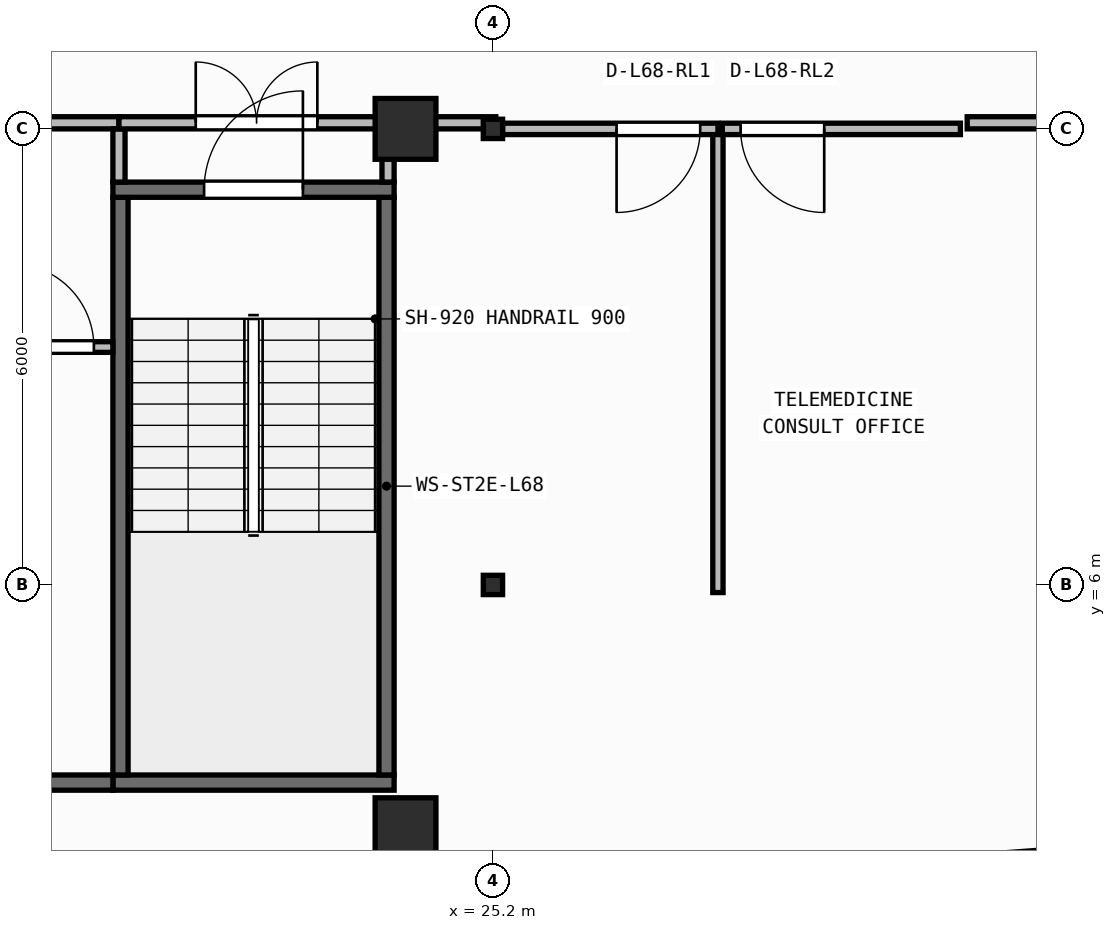
"""IFC4 building model, lengths in metres.
Left out: names, types, materials, properties, quantities, classifications, styles, units other than length and angle.
Written with IfcOpenShell. Run it as: python <this file> out.ifc"""

import sys

from ifc_helpers import new_model, si_unit, direction, frame, frame_2d, origin, origin_2d, place, context, subcontext, project, spatial, rectangle, i_section, extrude, element, fill, save


model = new_model("IFC4")
c1 = context("Model", 3, precision=1e-05, world=origin(), true_north=direction((0.0, 1.0)))
c2 = subcontext(c1, "Body", "Model", "MODEL_VIEW")
j1 = project(units=[si_unit("LENGTHUNIT", "METRE"), si_unit("PLANEANGLEUNIT", "RADIAN")], contexts=[c1])
p1 = place(None, origin())
s1 = spatial("IfcSite", under=j1, at=p1, CompositionType="ELEMENT")
p2 = place(p1, origin())
s2 = spatial("IfcBuilding", under=s1, at=p2, CompositionType="ELEMENT")
p3 = place(p2, frame((0.0, 0.0, 276.3)))
s3 = spatial("IfcBuildingStorey", under=s2, at=p3, CompositionType="ELEMENT", Elevation=276.3)
p4 = place(p3, frame((24.05, 2.8, 0.0), z_axis=(0.0, 0.0, 1.0), x_axis=(1.0, 0.0, 0.0)))
e1 = element("IfcColumn", 1, at=p4, inside=s3, PredefinedType="COLUMN", context=c2, shape_type="SweptSolid", body=[
    extrude(rectangle(XDim=0.8, YDim=0.8, at=origin_2d()), origin(), (0.0, 0.0, 1.0), 3.95),
])
p5 = place(p3, frame((25.2, 6.0, 0.0), z_axis=(0.0, 0.0, 1.0), x_axis=(1.0, 0.0, 0.0)))
e2 = element("IfcColumn", 2, at=p5, inside=s3, PredefinedType="COLUMN", context=c2, shape_type="SweptSolid", body=[
    extrude(i_section(OverallWidth=0.254, OverallDepth=0.254, WebThickness=0.009, FlangeThickness=0.014, FilletRadius=0.013, at=origin_2d()), origin(), (0.0, 0.0, 1.0), 3.95),
])
p6 = place(p3, frame((24.05, 12.0, 0.0), z_axis=(0.0, 0.0, 1.0), x_axis=(1.0, 0.0, 0.0)))
e3 = element("IfcColumn", 3, at=p6, inside=s3, PredefinedType="COLUMN", context=c2, shape_type="SweptSolid", body=[
    extrude(rectangle(XDim=0.8, YDim=0.8, at=origin_2d()), origin(), (0.0, 0.0, 1.0), 3.95),
])
p7 = place(p3, frame((25.2, 12.0, 0.0), z_axis=(0.0, 0.0, 1.0), x_axis=(1.0, 0.0, 0.0)))
e4 = element("IfcColumn", 4, at=p7, inside=s3, PredefinedType="COLUMN", context=c2, shape_type="SweptSolid", body=[
    extrude(i_section(OverallWidth=0.254, OverallDepth=0.254, WebThickness=0.009, FlangeThickness=0.014, FilletRadius=0.013, at=origin_2d()), origin(), (0.0, 0.0, 1.0), 3.95),
])
p8 = place(p3, frame((2.46, 0.172, 0.0), z_axis=(0.0, 0.0, 1.0), x_axis=(0.997289775118, 0.073573802713, 0.0)))
e5 = element("IfcWall", 5, at=p8, inside=s3, PredefinedType="STANDARD", context=c2, shape_type="SweptSolid", body=[
    extrude(rectangle(XDim=36.379, YDim=0.26, at=frame_2d((18.189, 0.0))), origin(), (0.0, 0.0, 1.0), 3.71),
])
p9 = place(p8, frame((16.989, 0.0, 0.9)))
e6 = element("IfcOpeningElement", 6, at=p9, cuts=e5, PredefinedType="OPENING", context=c2, shape_type="SweptSolid", body=[
    extrude(rectangle(XDim=2.4, YDim=1.65, at=frame_2d((1.2, 0.825))), frame((0.0, 0.14, 0.0), z_axis=(0.0, -1.0, 0.0), x_axis=(1.0, 0.0, 0.0)), (0.0, 0.0, 1.0), 0.28),
])
p10 = place(p3, frame((20.2, 3.4, 0.0), z_axis=(0.0, 0.0, 1.0), x_axis=(1.0, 0.0, 0.0)))
e7 = element("IfcWall", 7, at=p10, inside=s3, PredefinedType="SHEAR", context=c2, shape_type="SweptSolid", body=[
    extrude(rectangle(XDim=3.7, YDim=0.2, at=frame_2d((1.85, 0.0))), origin(), (0.0, 0.0, 1.0), 3.71),
])
for number, where, z_axis, x_axis in (
    (8, (20.3, 3.5, 0.0), (0.0, 0.0, 1.0), (0.0, 1.0, 0.0)),
    (9, (23.8, 3.5, 0.0), (0.0, 0.0, 1.0), (0.0, 1.0, 0.0)),
):
    element("IfcWall", number, at=place(p3, frame(where, z_axis=z_axis, x_axis=x_axis)), inside=s3, PredefinedType="SHEAR", context=c2, shape_type="SweptSolid", body=[
        extrude(rectangle(XDim=7.6, YDim=0.2, at=frame_2d((3.8, 0.0))), origin(), (0.0, 0.0, 1.0), 3.71),
    ])
p11 = place(p3, frame((20.2, 11.2, 0.0), z_axis=(0.0, 0.0, 1.0), x_axis=(1.0, 0.0, 0.0)))
e10 = element("IfcWall", 10, at=p11, inside=s3, PredefinedType="SHEAR", context=c2, shape_type="SweptSolid", body=[
    extrude(rectangle(XDim=3.7, YDim=0.2, at=frame_2d((1.85, 0.0))), origin(), (0.0, 0.0, 1.0), 3.71),
])
p12 = place(p11, frame((1.2, 0.0, 0.0)))
e11 = element("IfcOpeningElement", 11, at=p12, cuts=e10, PredefinedType="OPENING", context=c2, shape_type="SweptSolid", body=[
    extrude(rectangle(XDim=1.3, YDim=2.15, at=frame_2d((0.65, 1.075))), frame((0.0, 0.11, 0.0), z_axis=(0.0, -1.0, 0.0), x_axis=(1.0, 0.0, 0.0)), (0.0, 0.0, 1.0), 0.22),
])
p13 = place(p3, frame((6.5, 3.4, 0.0), z_axis=(0.0, 0.0, 1.0), x_axis=(1.0, 0.0, 0.0)))
e12 = element("IfcWall", 12, at=p13, inside=s3, PredefinedType="SHEAR", context=c2, shape_type="SweptSolid", body=[
    extrude(rectangle(XDim=13.7, YDim=0.2, at=frame_2d((6.85, 0.0))), origin(), (0.0, 0.0, 1.0), 3.71),
])
p14 = place(p3, frame((18.61, 9.13, 0.0), z_axis=(0.0, 0.0, 1.0), x_axis=(1.0, 0.0, 0.0)))
e13 = element("IfcWall", 13, at=p14, inside=s3, PredefinedType="PARTITIONING", context=c2, shape_type="SweptSolid", body=[
    extrude(rectangle(XDim=1.59, YDim=0.14, at=frame_2d((0.795, 0.0))), origin(), (0.0, 0.0, 1.0), 3.71),
])
p15 = place(p14, frame((0.24, 0.0, 0.0)))
e14 = element("IfcOpeningElement", 14, at=p15, cuts=e13, PredefinedType="OPENING", context=c2, shape_type="SweptSolid", body=[
    extrude(rectangle(XDim=1.1, YDim=2.1, at=frame_2d((0.55, 1.05))), frame((0.0, 0.08, 0.0), z_axis=(0.0, -1.0, 0.0), x_axis=(1.0, 0.0, 0.0)), (0.0, 0.0, 1.0), 0.16),
])
p16 = place(p3, frame((12.58, 12.08, 0.0), z_axis=(0.0, 0.0, 1.0), x_axis=(1.0, 0.0, 0.0)))
e15 = element("IfcWall", 15, at=p16, inside=s3, PredefinedType="PARTITIONING", context=c2, shape_type="SweptSolid", body=[
    extrude(rectangle(XDim=7.7, YDim=0.16, at=frame_2d((3.85, 0.0))), origin(), (0.0, 0.0, 1.0), 3.157),
])
p17 = place(p16, frame((3.05, 0.0, 0.0)))
e16 = element("IfcOpeningElement", 16, at=p17, cuts=e15, PredefinedType="OPENING", context=c2, shape_type="SweptSolid", body=[
    extrude(rectangle(XDim=1.6, YDim=2.05, at=frame_2d((0.8, 1.025))), frame((0.0, 0.09, 0.0), z_axis=(0.0, -1.0, 0.0), x_axis=(1.0, 0.0, 0.0)), (0.0, 0.0, 1.0), 0.18),
])
p18 = place(p3, frame((20.28, 11.3, 0.0), z_axis=(0.0, 0.0, 1.0), x_axis=(0.0, 1.0, 0.0)))
e17 = element("IfcWall", 17, at=p18, inside=s3, PredefinedType="PARTITIONING", context=c2, shape_type="SweptSolid", body=[
    extrude(rectangle(XDim=0.7, YDim=0.16, at=frame_2d((0.35, 0.0))), origin(), (0.0, 0.0, 1.0), 3.71),
])
p19 = place(p3, frame((20.28, 12.08, 0.0), z_axis=(0.0, 0.0, 1.0), x_axis=(1.0, 0.0, 0.0)))
e18 = element("IfcWall", 18, at=p19, inside=s3, PredefinedType="PARTITIONING", context=c2, shape_type="SweptSolid", body=[
    extrude(rectangle(XDim=3.62, YDim=0.16, at=frame_2d((1.81, 0.0))), origin(), (0.0, 0.0, 1.0), 3.157),
])
p20 = place(p19, frame((1.01, 0.0, 0.0)))
e19 = element("IfcOpeningElement", 19, at=p20, cuts=e18, PredefinedType="OPENING", context=c2, shape_type="SweptSolid", body=[
    extrude(rectangle(XDim=1.6, YDim=2.05, at=frame_2d((0.8, 1.025))), frame((0.0, 0.09, 0.0), z_axis=(0.0, -1.0, 0.0), x_axis=(1.0, 0.0, 0.0)), (0.0, 0.0, 1.0), 0.18),
])
p21 = place(p3, frame((23.82, 11.3, 0.0), z_axis=(0.0, 0.0, 1.0), x_axis=(0.0, 1.0, 0.0)))
e20 = element("IfcWall", 20, at=p21, inside=s3, PredefinedType="PARTITIONING", context=c2, shape_type="SweptSolid", body=[
    extrude(rectangle(XDim=0.7, YDim=0.16, at=frame_2d((0.35, 0.0))), origin(), (0.0, 0.0, 1.0), 3.71),
])
p22 = place(p3, frame((28.16, 5.9, 0.0), z_axis=(0.0, 0.0, 1.0), x_axis=(0.0, 1.0, 0.0)))
e21 = element("IfcWall", 21, at=p22, inside=s3, PredefinedType="PARTITIONING", context=c2, shape_type="SweptSolid", body=[
    extrude(rectangle(XDim=6.1, YDim=0.135, at=frame_2d((3.05, 0.0))), origin(), (0.0, 0.0, 1.0), 3.71),
])
p23 = place(p3, frame((28.16, 12.0, 0.0), z_axis=(0.0, 0.0, 1.0), x_axis=(-1.0, 0.0, 0.0)))
e22 = element("IfcWall", 22, at=p23, inside=s3, PredefinedType="PARTITIONING", context=c2, shape_type="SweptSolid", body=[
    extrude(rectangle(XDim=2.833, YDim=0.15, at=frame_2d((1.417, 0.0))), origin(), (0.0, 0.0, 1.0), 3.157),
])
p24 = place(p23, frame((0.233, 0.0, 0.0)))
e23 = element("IfcOpeningElement", 23, at=p24, cuts=e22, PredefinedType="OPENING", context=c2, shape_type="SweptSolid", body=[
    extrude(rectangle(XDim=1.1, YDim=2.1, at=frame_2d((0.55, 1.05))), frame((0.0, 0.085, 0.0), z_axis=(0.0, -1.0, 0.0), x_axis=(1.0, 0.0, 0.0)), (0.0, 0.0, 1.0), 0.17),
])
p25 = place(p3, frame((31.35, 12.0, 0.0), z_axis=(0.0, 0.0, 1.0), x_axis=(-1.0, 0.0, 0.0)))
e24 = element("IfcWall", 24, at=p25, inside=s3, PredefinedType="PARTITIONING", context=c2, shape_type="SweptSolid", body=[
    extrude(rectangle(XDim=3.133, YDim=0.15, at=frame_2d((1.566, 0.0))), origin(), (0.0, 0.0, 1.0), 3.157),
])
p26 = place(p25, frame((1.792, 0.0, 0.0)))
e25 = element("IfcOpeningElement", 25, at=p26, cuts=e24, PredefinedType="OPENING", context=c2, shape_type="SweptSolid", body=[
    extrude(rectangle(XDim=1.1, YDim=2.1, at=frame_2d((0.55, 1.05))), frame((0.0, 0.085, 0.0), z_axis=(0.0, -1.0, 0.0), x_axis=(1.0, 0.0, 0.0)), (0.0, 0.0, 1.0), 0.17),
])
p27 = place(p3, frame((24.02, 12.08, 0.0), z_axis=(0.0, 0.0, 1.0), x_axis=(1.0, 0.0, 0.0)))
e26 = element("IfcWall", 26, at=p27, inside=s3, PredefinedType="PARTITIONING", context=c2, shape_type="SweptSolid", body=[
    extrude(rectangle(XDim=1.218, YDim=0.16, at=frame_2d((0.609, 0.0))), origin(), (0.0, 0.0, 1.0), 3.157),
])
p28 = place(p3, frame((31.439, 12.08, 0.0), z_axis=(0.0, 0.0, 1.0), x_axis=(1.0, 0.0, 0.0)))
e27 = element("IfcWall", 27, at=p28, inside=s3, PredefinedType="PARTITIONING", context=c2, shape_type="SweptSolid", body=[
    extrude(rectangle(XDim=2.198, YDim=0.16, at=frame_2d((1.099, 0.0))), origin(), (0.0, 0.0, 1.0), 3.157),
])
p29 = place(p12, origin())
e28 = element("IfcDoor", 28, at=p29, inside=s3, OperationType="SINGLE_SWING_RIGHT", PredefinedType="DOOR", context=c2, shape_type="SweptSolid", body=[
    extrude(rectangle(XDim=1.3, YDim=2.15, at=frame_2d((0.65, 1.075))), frame((0.0, 0.025, 0.0), z_axis=(0.0, -1.0, 0.0), x_axis=(1.0, 0.0, 0.0)), (0.0, 0.0, 1.0), 0.05),
])
fill(e11, e28)
p30 = place(p15, origin())
e29 = element("IfcDoor", 29, at=p30, inside=s3, OperationType="SINGLE_SWING_LEFT", PredefinedType="DOOR", context=c2, shape_type="SweptSolid", body=[
    extrude(rectangle(XDim=1.1, YDim=2.1, at=frame_2d((0.55, 1.05))), frame((0.0, 0.025, 0.0), z_axis=(0.0, -1.0, 0.0), x_axis=(1.0, 0.0, 0.0)), (0.0, 0.0, 1.0), 0.05),
])
fill(e14, e29)
p31 = place(p20, origin())
e30 = element("IfcDoor", 30, at=p31, inside=s3, OperationType="DOUBLE_DOOR_SINGLE_SWING", PredefinedType="DOOR", context=c2, shape_type="SweptSolid", body=[
    extrude(rectangle(XDim=1.6, YDim=2.05, at=frame_2d((0.8, 1.025))), frame((0.0, 0.025, 0.0), z_axis=(0.0, -1.0, 0.0), x_axis=(1.0, 0.0, 0.0)), (0.0, 0.0, 1.0), 0.05),
])
fill(e19, e30)
p32 = place(p24, origin())
e31 = element("IfcDoor", 31, at=p32, inside=s3, OperationType="SINGLE_SWING_RIGHT", PredefinedType="DOOR", context=c2, shape_type="SweptSolid", body=[
    extrude(rectangle(XDim=1.1, YDim=2.1, at=frame_2d((0.55, 1.05))), frame((0.0, 0.025, 0.0), z_axis=(0.0, -1.0, 0.0), x_axis=(1.0, 0.0, 0.0)), (0.0, 0.0, 1.0), 0.05),
])
fill(e23, e31)
p33 = place(p26, origin())
e32 = element("IfcDoor", 32, at=p33, inside=s3, OperationType="SINGLE_SWING_LEFT", PredefinedType="DOOR", context=c2, shape_type="SweptSolid", body=[
    extrude(rectangle(XDim=1.1, YDim=2.1, at=frame_2d((0.55, 1.05))), frame((0.0, 0.025, 0.0), z_axis=(0.0, -1.0, 0.0), x_axis=(1.0, 0.0, 0.0)), (0.0, 0.0, 1.0), 0.05),
])
fill(e25, e32)
save(model, sys.argv[1])
